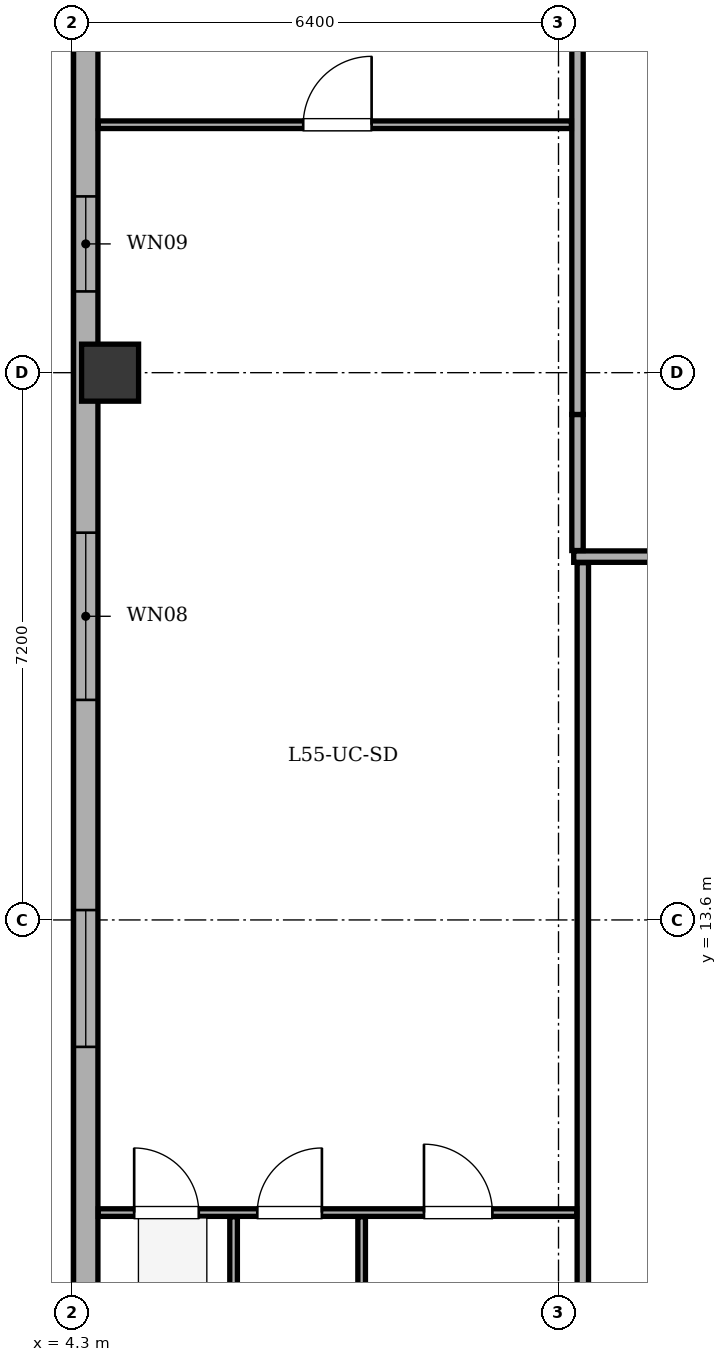
"""IFC4 building model, lengths in metres.
Left out: names, types, materials, properties, quantities, classifications, styles, units other than length and angle.
Written with IfcOpenShell. Run it as: python <this file> out.ifc"""

import sys

from ifc_helpers import new_model, si_unit, direction, frame, frame_2d, origin, origin_2d, place, context, subcontext, project, spatial, rectangle, extrude, element, fill, save


model = new_model("IFC4")
c1 = context("Model", 3, precision=1e-05, world=origin(), true_north=direction((0.0, 1.0)))
c2 = subcontext(c1, "Body", "Model", "MODEL_VIEW")
j1 = project(units=[si_unit("LENGTHUNIT", "METRE"), si_unit("PLANEANGLEUNIT", "RADIAN")], contexts=[c1])
p1 = place(None, origin())
s1 = spatial("IfcSite", under=j1, at=p1, CompositionType="ELEMENT")
p2 = place(p1, origin())
s2 = spatial("IfcBuilding", under=s1, at=p2, CompositionType="ELEMENT")
p3 = place(p2, frame((0.0, 0.0, 214.3)))
s3 = spatial("IfcBuildingStorey", under=s2, at=p3, CompositionType="ELEMENT", Elevation=214.3)
p4 = place(p3, frame((4.8, 20.8, 0.0), z_axis=(0.0, 0.0, 1.0), x_axis=(1.0, 0.0, 0.0)))
e1 = element("IfcColumn", 1, at=p4, inside=s3, PredefinedType="COLUMN", context=c2, shape_type="SweptSolid", body=[
    extrude(rectangle(XDim=0.75, YDim=0.75, at=origin_2d()), origin(), (0.0, 0.0, 1.0), 3.4),
])
p5 = place(p3, frame((4.48, 7.2, 0.0), z_axis=(0.0, 0.0, 1.0), x_axis=(0.0, 1.0, 0.0)))
e2 = element("IfcWall", 2, at=p5, inside=s3, PredefinedType="STANDARD", context=c2, shape_type="SweptSolid", body=[
    extrude(rectangle(XDim=27.8, YDim=0.32, at=frame_2d((13.9, 0.0))), origin(), (0.0, 0.0, 1.0), 2.725),
])
p6 = place(p5, frame((4.73, 0.0, 0.75)))
e3 = element("IfcOpeningElement", 3, at=p6, cuts=e2, PredefinedType="OPENING", context=c2, shape_type="SweptSolid", body=[
    extrude(rectangle(XDim=1.8, YDim=1.7, at=frame_2d((0.9, 0.85))), frame((0.0, 0.17, 0.0), z_axis=(0.0, -1.0, 0.0), x_axis=(1.0, 0.0, 0.0)), (0.0, 0.0, 1.0), 0.34),
])
p7 = place(p5, frame((9.295, 0.0, 0.75)))
e4 = element("IfcOpeningElement", 4, at=p7, cuts=e2, PredefinedType="OPENING", context=c2, shape_type="SweptSolid", body=[
    extrude(rectangle(XDim=2.2, YDim=1.7, at=frame_2d((1.1, 0.85))), frame((0.0, 0.17, 0.0), z_axis=(0.0, -1.0, 0.0), x_axis=(1.0, 0.0, 0.0)), (0.0, 0.0, 1.0), 0.34),
])
p8 = place(p5, frame((14.669, 0.0, 0.75)))
e5 = element("IfcOpeningElement", 5, at=p8, cuts=e2, PredefinedType="OPENING", context=c2, shape_type="SweptSolid", body=[
    extrude(rectangle(XDim=1.25, YDim=1.7, at=frame_2d((0.625, 0.85))), frame((0.0, 0.17, 0.0), z_axis=(0.0, -1.0, 0.0), x_axis=(1.0, 0.0, 0.0)), (0.0, 0.0, 1.0), 0.34),
])
p9 = place(p5, frame((18.649, 0.0, 0.75)))
e6 = element("IfcOpeningElement", 6, at=p9, cuts=e2, PredefinedType="OPENING", context=c2, shape_type="SweptSolid", body=[
    extrude(rectangle(XDim=1.8, YDim=1.7, at=frame_2d((0.9, 0.85))), frame((0.0, 0.17, 0.0), z_axis=(0.0, -1.0, 0.0), x_axis=(1.0, 0.0, 0.0)), (0.0, 0.0, 1.0), 0.34),
])
p10 = place(p5, frame((22.488, 0.0, 0.75)))
e7 = element("IfcOpeningElement", 7, at=p10, cuts=e2, PredefinedType="OPENING", context=c2, shape_type="SweptSolid", body=[
    extrude(rectangle(XDim=2.2, YDim=1.7, at=frame_2d((1.1, 0.85))), frame((0.0, 0.17, 0.0), z_axis=(0.0, -1.0, 0.0), x_axis=(1.0, 0.0, 0.0)), (0.0, 0.0, 1.0), 0.34),
])
p11 = place(p3, frame((10.9, 18.38, 0.0), z_axis=(0.0, 0.0, 1.0), x_axis=(1.0, 0.0, 0.0)))
e8 = element("IfcWall", 8, at=p11, inside=s3, PredefinedType="PARTITIONING", context=c2, shape_type="SweptSolid", body=[
    extrude(rectangle(XDim=34.02, YDim=0.15, at=frame_2d((17.01, 0.0))), origin(), (0.0, 0.0, 1.0), 3.1),
])
p12 = place(p11, frame((7.727, 0.0, 0.0)))
e9 = element("IfcOpeningElement", 9, at=p12, cuts=e8, PredefinedType="OPENING", context=c2, shape_type="SweptSolid", body=[
    extrude(rectangle(XDim=1.0, YDim=2.1, at=frame_2d((0.5, 1.05))), frame((0.0, 0.085, 0.0), z_axis=(0.0, -1.0, 0.0), x_axis=(1.0, 0.0, 0.0)), (0.0, 0.0, 1.0), 0.17),
])
p13 = place(p11, frame((24.617, 0.0, 0.0)))
e10 = element("IfcOpeningElement", 10, at=p13, cuts=e8, PredefinedType="OPENING", context=c2, shape_type="SweptSolid", body=[
    extrude(rectangle(XDim=1.0, YDim=2.1, at=frame_2d((0.5, 1.05))), frame((0.0, 0.085, 0.0), z_axis=(0.0, -1.0, 0.0), x_axis=(1.0, 0.0, 0.0)), (0.0, 0.0, 1.0), 0.17),
])
p14 = place(p3, frame((11.02, 3.045, 0.0), z_axis=(0.0, 0.0, 1.0), x_axis=(0.0, 1.0, 0.0)))
e11 = element("IfcWall", 11, at=p14, inside=s3, PredefinedType="PARTITIONING", context=c2, shape_type="SweptSolid", body=[
    extrude(rectangle(XDim=15.255, YDim=0.15, at=frame_2d((7.627, 0.0))), origin(), (0.0, 0.0, 1.0), 3.1),
])
p15 = place(p3, frame((10.95, 18.46, 0.0), z_axis=(0.0, 0.0, 1.0), x_axis=(0.0, 1.0, 0.0)))
e12 = element("IfcWall", 12, at=p15, inside=s3, PredefinedType="PARTITIONING", context=c2, shape_type="SweptSolid", body=[
    extrude(rectangle(XDim=1.79, YDim=0.15, at=frame_2d((0.895, 0.0))), origin(), (0.0, 0.0, 1.0), 3.1),
])
p16 = place(p3, frame((10.95, 20.25, 0.0), z_axis=(0.0, 0.0, 1.0), x_axis=(0.0, 1.0, 0.0)))
e13 = element("IfcWall", 13, at=p16, inside=s3, PredefinedType="PARTITIONING", context=c2, shape_type="SweptSolid", body=[
    extrude(rectangle(XDim=13.9, YDim=0.15, at=frame_2d((6.95, 0.0))), origin(), (0.0, 0.0, 1.0), 3.1),
])
p17 = place(p3, frame((4.645, 9.75, 0.0), z_axis=(0.0, 0.0, 1.0), x_axis=(1.0, 0.0, 0.0)))
e14 = element("IfcWall", 14, at=p17, inside=s3, PredefinedType="PARTITIONING", context=c2, shape_type="SweptSolid", body=[
    extrude(rectangle(XDim=6.295, YDim=0.1, at=frame_2d((3.147, 0.0))), origin(), (0.0, 0.0, 1.0), 3.1),
])
p18 = place(p17, frame((0.472, 0.0, 0.0)))
e15 = element("IfcOpeningElement", 15, at=p18, cuts=e14, PredefinedType="OPENING", context=c2, shape_type="SweptSolid", body=[
    extrude(rectangle(XDim=0.85, YDim=2.05, at=frame_2d((0.425, 1.025))), frame((0.0, 0.06, 0.0), z_axis=(0.0, -1.0, 0.0), x_axis=(1.0, 0.0, 0.0)), (0.0, 0.0, 1.0), 0.12),
])
p19 = place(p17, frame((2.092, 0.0, 0.0)))
e16 = element("IfcOpeningElement", 16, at=p19, cuts=e14, PredefinedType="OPENING", context=c2, shape_type="SweptSolid", body=[
    extrude(rectangle(XDim=0.85, YDim=2.05, at=frame_2d((0.425, 1.025))), frame((0.0, 0.06, 0.0), z_axis=(0.0, -1.0, 0.0), x_axis=(1.0, 0.0, 0.0)), (0.0, 0.0, 1.0), 0.12),
])
p20 = place(p17, frame((4.285, 0.0, 0.0)))
e17 = element("IfcOpeningElement", 17, at=p20, cuts=e14, PredefinedType="OPENING", context=c2, shape_type="SweptSolid", body=[
    extrude(rectangle(XDim=0.9, YDim=2.05, at=frame_2d((0.45, 1.025))), frame((0.0, 0.06, 0.0), z_axis=(0.0, -1.0, 0.0), x_axis=(1.0, 0.0, 0.0)), (0.0, 0.0, 1.0), 0.12),
])
p21 = place(p3, frame((4.645, 24.062, 0.0), z_axis=(0.0, 0.0, 1.0), x_axis=(1.0, 0.0, 0.0)))
e18 = element("IfcWall", 18, at=p21, inside=s3, PredefinedType="PARTITIONING", context=c2, shape_type="SweptSolid", body=[
    extrude(rectangle(XDim=6.225, YDim=0.1, at=frame_2d((3.113, 0.0))), origin(), (0.0, 0.0, 1.0), 3.1),
])
p22 = place(p21, frame((2.696, 0.0, 0.0)))
e19 = element("IfcOpeningElement", 19, at=p22, cuts=e18, PredefinedType="OPENING", context=c2, shape_type="SweptSolid", body=[
    extrude(rectangle(XDim=0.9, YDim=2.05, at=frame_2d((0.45, 1.025))), frame((0.0, 0.06, 0.0), z_axis=(0.0, -1.0, 0.0), x_axis=(1.0, 0.0, 0.0)), (0.0, 0.0, 1.0), 0.12),
])
for number, where, z_axis, x_axis in (
    (20, (6.425, 7.08, 0.0), (0.0, 0.0, 1.0), (0.0, 1.0, 0.0)),
    (21, (8.11, 7.08, 0.0), (0.0, 0.0, 1.0), (0.0, 1.0, 0.0)),
):
    element("IfcWall", number, at=place(p3, frame(where, z_axis=z_axis, x_axis=x_axis)), inside=s3, PredefinedType="PARTITIONING", context=c2, shape_type="SweptSolid", body=[
        extrude(rectangle(XDim=2.615, YDim=0.1, at=frame_2d((1.308, 0.0))), origin(), (0.0, 0.0, 1.0), 3.1),
    ])
p23 = place(p6, origin())
e22 = element("IfcWindow", 22, at=p23, inside=s3, PartitioningType="SINGLE_PANEL", PredefinedType="WINDOW", context=c2, shape_type="SweptSolid", body=[
    extrude(rectangle(XDim=1.8, YDim=1.7, at=frame_2d((0.9, 0.85))), frame((0.0, -0.01, 0.0), z_axis=(0.0, -1.0, 0.0), x_axis=(1.0, 0.0, 0.0)), (0.0, 0.0, 1.0), 0.06),
])
fill(e3, e22)
p24 = place(p7, origin())
e23 = element("IfcWindow", 23, at=p24, inside=s3, PartitioningType="SINGLE_PANEL", PredefinedType="WINDOW", context=c2, shape_type="SweptSolid", body=[
    extrude(rectangle(XDim=2.2, YDim=1.7, at=frame_2d((1.1, 0.85))), frame((0.0, -0.01, 0.0), z_axis=(0.0, -1.0, 0.0), x_axis=(1.0, 0.0, 0.0)), (0.0, 0.0, 1.0), 0.06),
])
fill(e4, e23)
p25 = place(p8, origin())
e24 = element("IfcWindow", 24, at=p25, inside=s3, PartitioningType="SINGLE_PANEL", PredefinedType="WINDOW", context=c2, shape_type="SweptSolid", body=[
    extrude(rectangle(XDim=1.25, YDim=1.7, at=frame_2d((0.625, 0.85))), frame((0.0, -0.01, 0.0), z_axis=(0.0, -1.0, 0.0), x_axis=(1.0, 0.0, 0.0)), (0.0, 0.0, 1.0), 0.06),
])
fill(e5, e24)
p26 = place(p22, origin())
e25 = element("IfcDoor", 25, at=p26, inside=s3, OperationType="SINGLE_SWING_RIGHT", PredefinedType="DOOR", context=c2, shape_type="SweptSolid", body=[
    extrude(rectangle(XDim=0.9, YDim=2.05, at=frame_2d((0.45, 1.025))), frame((0.0, 0.025, 0.0), z_axis=(0.0, -1.0, 0.0), x_axis=(1.0, 0.0, 0.0)), (0.0, 0.0, 1.0), 0.05),
])
fill(e19, e25)
p27 = place(p18, origin())
e26 = element("IfcDoor", 26, at=p27, inside=s3, OperationType="SINGLE_SWING_LEFT", PredefinedType="DOOR", context=c2, shape_type="SweptSolid", body=[
    extrude(rectangle(XDim=0.85, YDim=2.05, at=frame_2d((0.425, 1.025))), frame((0.0, 0.025, 0.0), z_axis=(0.0, -1.0, 0.0), x_axis=(1.0, 0.0, 0.0)), (0.0, 0.0, 1.0), 0.05),
])
fill(e15, e26)
p28 = place(p19, origin())
e27 = element("IfcDoor", 27, at=p28, inside=s3, OperationType="SINGLE_SWING_RIGHT", PredefinedType="DOOR", context=c2, shape_type="SweptSolid", body=[
    extrude(rectangle(XDim=0.85, YDim=2.05, at=frame_2d((0.425, 1.025))), frame((0.0, 0.025, 0.0), z_axis=(0.0, -1.0, 0.0), x_axis=(1.0, 0.0, 0.0)), (0.0, 0.0, 1.0), 0.05),
])
fill(e16, e27)
p29 = place(p20, origin())
e28 = element("IfcDoor", 28, at=p29, inside=s3, OperationType="SINGLE_SWING_LEFT", PredefinedType="DOOR", context=c2, shape_type="SweptSolid", body=[
    extrude(rectangle(XDim=0.9, YDim=2.05, at=frame_2d((0.45, 1.025))), frame((0.0, 0.025, 0.0), z_axis=(0.0, -1.0, 0.0), x_axis=(1.0, 0.0, 0.0)), (0.0, 0.0, 1.0), 0.05),
])
fill(e17, e28)
save(model, sys.argv[1])
